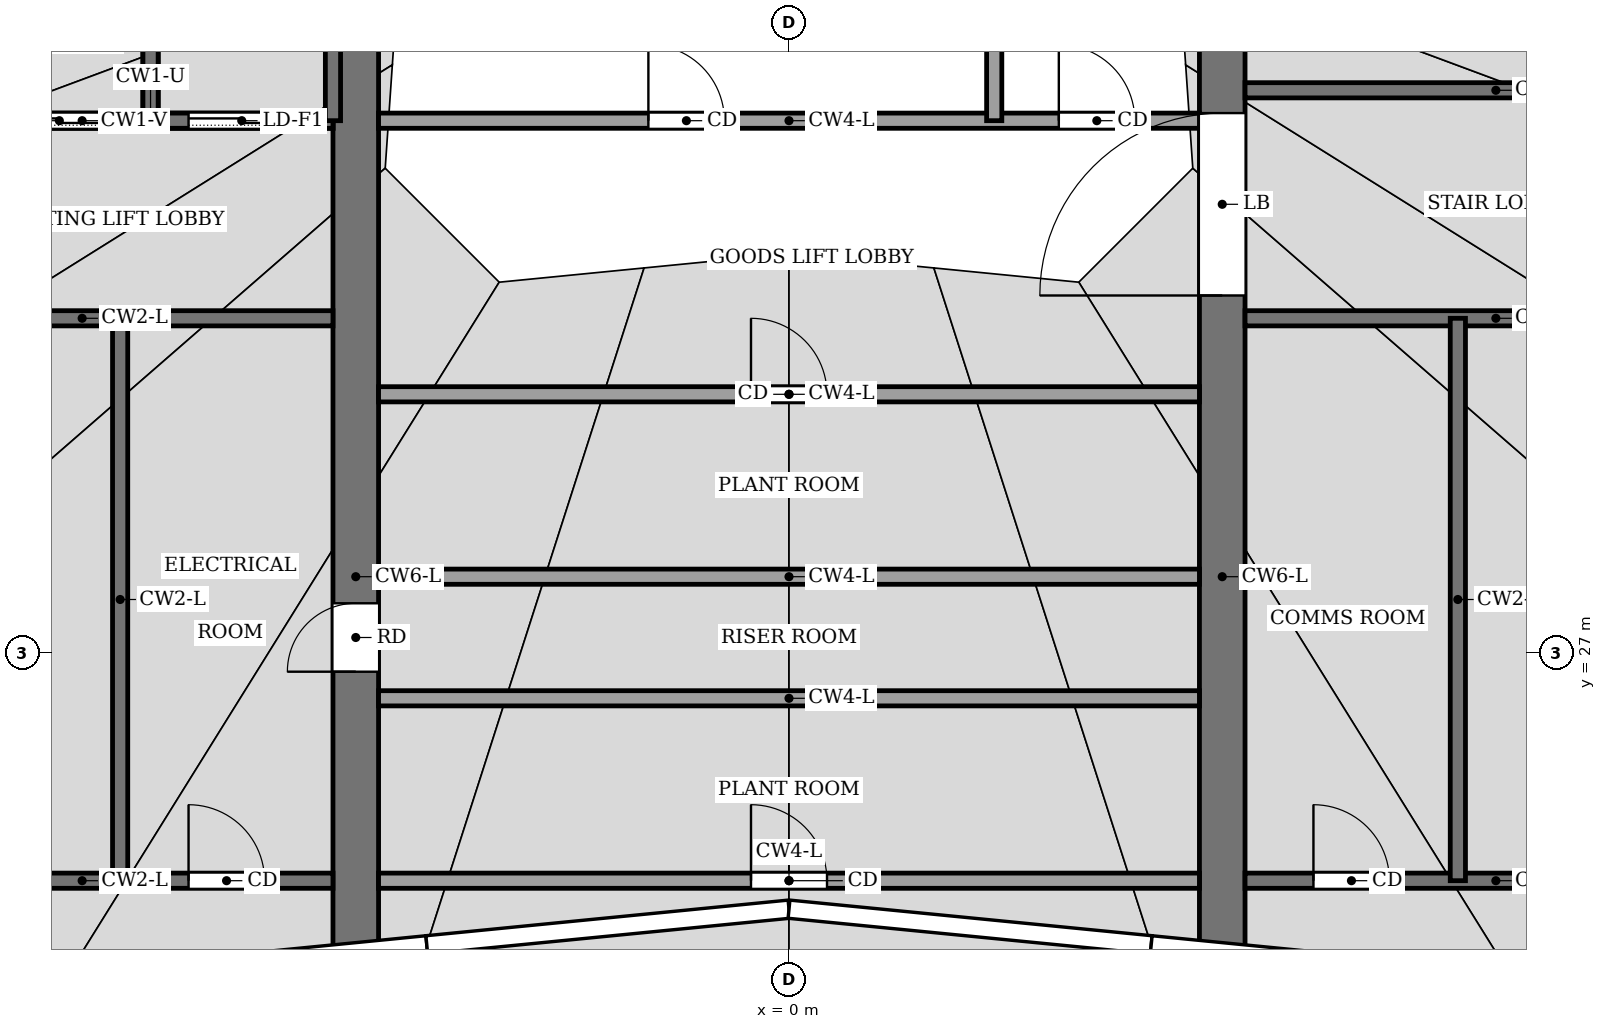
"""IFC4 building model, lengths in metres.
Left out: names, types, materials, properties, quantities, classifications, styles, units other than length and angle.
Written with IfcOpenShell. Run it as: python <this file> out.ifc"""

import sys

from ifc_helpers import new_model, si_unit, direction, frame, frame_2d, origin, place, context, subcontext, project, spatial, rectangle, extrude, element, fill, save


model = new_model("IFC4")
c1 = context("Model", 3, precision=1e-05, world=origin(), true_north=direction((0.0, 1.0)))
c2 = subcontext(c1, "Body", "Model", "MODEL_VIEW")
j1 = project(units=[si_unit("LENGTHUNIT", "METRE"), si_unit("PLANEANGLEUNIT", "RADIAN")], contexts=[c1])
p1 = place(None, origin())
s1 = spatial("IfcSite", under=j1, at=p1, CompositionType="ELEMENT")
p2 = place(p1, origin())
s2 = spatial("IfcBuilding", under=s1, at=p2, CompositionType="ELEMENT")
p3 = place(p2, frame((0.0, 0.0, 368.0)))
s3 = spatial("IfcBuildingStorey", under=s2, at=p3, CompositionType="ELEMENT", Elevation=368.0)
p4 = place(p3, frame((-5.7, 18.4, -0.15), z_axis=(0.0, 0.0, 1.0), x_axis=(0.0, 1.0, 0.0)))
e1 = element("IfcWall", 1, at=p4, inside=s3, PredefinedType="SHEAR", context=c2, shape_type="SweptSolid", body=[
    extrude(rectangle(XDim=19.2, YDim=0.6, at=frame_2d((9.6, 0.0))), origin(), (0.0, 0.0, 1.0), 3.45),
])
p5 = place(p4, frame((8.35, 0.0, 0.15)))
e2 = element("IfcOpeningElement", 2, at=p5, cuts=e1, PredefinedType="OPENING", context=c2, shape_type="SweptSolid", body=[
    extrude(rectangle(XDim=0.9, YDim=2.1, at=frame_2d((0.45, 1.05))), frame((0.0, 0.31, 0.0), z_axis=(0.0, -1.0, 0.0), x_axis=(1.0, 0.0, 0.0)), (0.0, 0.0, 1.0), 0.62),
])
p6 = place(p3, frame((5.7, 18.4, -0.15), z_axis=(0.0, 0.0, 1.0), x_axis=(0.0, 1.0, 0.0)))
e3 = element("IfcWall", 3, at=p6, inside=s3, PredefinedType="SHEAR", context=c2, shape_type="SweptSolid", body=[
    extrude(rectangle(XDim=19.2, YDim=0.6, at=frame_2d((9.6, 0.0))), origin(), (0.0, 0.0, 1.0), 3.45),
])
p7 = place(p6, frame((13.3, 0.0, 0.15)))
e4 = element("IfcOpeningElement", 4, at=p7, cuts=e3, PredefinedType="OPENING", context=c2, shape_type="SweptSolid", body=[
    extrude(rectangle(XDim=2.4, YDim=2.4, at=frame_2d((1.2, 1.2))), frame((0.0, 0.31, 0.0), z_axis=(0.0, -1.0, 0.0), x_axis=(1.0, 0.0, 0.0)), (0.0, 0.0, 1.0), 0.62),
])
p8 = place(p3, frame((-12.6, 24.0, 0.0), z_axis=(0.0, 0.0, 1.0), x_axis=(1.0, 0.0, 0.0)))
e5 = element("IfcWall", 5, at=p8, inside=s3, PredefinedType="PARTITIONING", context=c2, shape_type="SweptSolid", body=[
    extrude(rectangle(XDim=6.6, YDim=0.2, at=frame_2d((3.3, 0.0))), origin(), (0.0, 0.0, 1.0), 3.3),
])
p9 = place(p8, frame((4.7, 0.0, 0.0)))
e6 = element("IfcOpeningElement", 6, at=p9, cuts=e5, PredefinedType="OPENING", context=c2, shape_type="SweptSolid", body=[
    extrude(rectangle(XDim=1.0, YDim=2.1, at=frame_2d((0.5, 1.05))), frame((0.0, 0.11, 0.0), z_axis=(0.0, -1.0, 0.0), x_axis=(1.0, 0.0, 0.0)), (0.0, 0.0, 1.0), 0.22),
])
p10 = place(p3, frame((-5.4, 24.0, 0.0), z_axis=(0.0, 0.0, 1.0), x_axis=(1.0, 0.0, 0.0)))
e7 = element("IfcWall", 7, at=p10, inside=s3, PredefinedType="PARTITIONING", context=c2, shape_type="SweptSolid", body=[
    extrude(rectangle(XDim=10.8, YDim=0.2, at=frame_2d((5.4, 0.0))), origin(), (0.0, 0.0, 1.0), 3.3),
])
p11 = place(p10, frame((4.9, 0.0, 0.0)))
e8 = element("IfcOpeningElement", 8, at=p11, cuts=e7, PredefinedType="OPENING", context=c2, shape_type="SweptSolid", body=[
    extrude(rectangle(XDim=1.0, YDim=2.1, at=frame_2d((0.5, 1.05))), frame((0.0, 0.11, 0.0), z_axis=(0.0, -1.0, 0.0), x_axis=(1.0, 0.0, 0.0)), (0.0, 0.0, 1.0), 0.22),
])
p12 = place(p3, frame((6.0, 24.0, 0.0), z_axis=(0.0, 0.0, 1.0), x_axis=(1.0, 0.0, 0.0)))
e9 = element("IfcWall", 9, at=p12, inside=s3, PredefinedType="PARTITIONING", context=c2, shape_type="SweptSolid", body=[
    extrude(rectangle(XDim=6.6, YDim=0.2, at=frame_2d((3.3, 0.0))), origin(), (0.0, 0.0, 1.0), 3.3),
])
p13 = place(p12, frame((0.9, 0.0, 0.0)))
e10 = element("IfcOpeningElement", 10, at=p13, cuts=e9, PredefinedType="OPENING", context=c2, shape_type="SweptSolid", body=[
    extrude(rectangle(XDim=1.0, YDim=2.1, at=frame_2d((0.5, 1.05))), frame((0.0, 0.11, 0.0), z_axis=(0.0, -1.0, 0.0), x_axis=(1.0, 0.0, 0.0)), (0.0, 0.0, 1.0), 0.22),
])
p14 = place(p12, frame((4.4, 0.0, 0.0)))
e11 = element("IfcOpeningElement", 11, at=p14, cuts=e9, PredefinedType="OPENING", context=c2, shape_type="SweptSolid", body=[
    extrude(rectangle(XDim=1.2, YDim=2.2, at=frame_2d((0.6, 1.1))), frame((0.0, 0.11, 0.0), z_axis=(0.0, -1.0, 0.0), x_axis=(1.0, 0.0, 0.0)), (0.0, 0.0, 1.0), 0.22),
])
for number, where, z_axis, x_axis in (
    (12, (-5.4, 26.4, 0.0), (0.0, 0.0, 1.0), (1.0, 0.0, 0.0)),
    (13, (-5.4, 28.0, 0.0), (0.0, 0.0, 1.0), (1.0, 0.0, 0.0)),
):
    element("IfcWall", number, at=place(p3, frame(where, z_axis=z_axis, x_axis=x_axis)), inside=s3, PredefinedType="PARTITIONING", context=c2, shape_type="SweptSolid", body=[
        extrude(rectangle(XDim=10.8, YDim=0.2, at=frame_2d((5.4, 0.0))), origin(), (0.0, 0.0, 1.0), 3.3),
    ])
p15 = place(p3, frame((-5.4, 30.4, 0.0), z_axis=(0.0, 0.0, 1.0), x_axis=(1.0, 0.0, 0.0)))
e14 = element("IfcWall", 14, at=p15, inside=s3, PredefinedType="PARTITIONING", context=c2, shape_type="SweptSolid", body=[
    extrude(rectangle(XDim=10.8, YDim=0.2, at=frame_2d((5.4, 0.0))), origin(), (0.0, 0.0, 1.0), 3.3),
])
p16 = place(p15, frame((4.9, 0.0, 0.0)))
e15 = element("IfcOpeningElement", 15, at=p16, cuts=e14, PredefinedType="OPENING", context=c2, shape_type="SweptSolid", body=[
    extrude(rectangle(XDim=1.0, YDim=2.1, at=frame_2d((0.5, 1.05))), frame((0.0, 0.11, 0.0), z_axis=(0.0, -1.0, 0.0), x_axis=(1.0, 0.0, 0.0)), (0.0, 0.0, 1.0), 0.22),
])
p17 = place(p3, frame((-12.6, 31.4, 0.0), z_axis=(0.0, 0.0, 1.0), x_axis=(1.0, 0.0, 0.0)))
e16 = element("IfcWall", 16, at=p17, inside=s3, PredefinedType="PARTITIONING", context=c2, shape_type="SweptSolid", body=[
    extrude(rectangle(XDim=6.6, YDim=0.2, at=frame_2d((3.3, 0.0))), origin(), (0.0, 0.0, 1.0), 3.3),
])
p18 = place(p17, frame((1.0, 0.0, 0.0)))
e17 = element("IfcOpeningElement", 17, at=p18, cuts=e16, PredefinedType="OPENING", context=c2, shape_type="SweptSolid", body=[
    extrude(rectangle(XDim=1.2, YDim=2.2, at=frame_2d((0.6, 1.1))), frame((0.0, 0.11, 0.0), z_axis=(0.0, -1.0, 0.0), x_axis=(1.0, 0.0, 0.0)), (0.0, 0.0, 1.0), 0.22),
])
p19 = place(p3, frame((6.0, 31.4, 0.0), z_axis=(0.0, 0.0, 1.0), x_axis=(1.0, 0.0, 0.0)))
e18 = element("IfcWall", 18, at=p19, inside=s3, PredefinedType="PARTITIONING", context=c2, shape_type="SweptSolid", body=[
    extrude(rectangle(XDim=6.6, YDim=0.2, at=frame_2d((3.3, 0.0))), origin(), (0.0, 0.0, 1.0), 3.3),
])
p20 = place(p3, frame((-12.6, 34.0, 0.0), z_axis=(0.0, 0.0, 1.0), x_axis=(1.0, 0.0, 0.0)))
e19 = element("IfcWall", 19, at=p20, inside=s3, PredefinedType="PARTITIONING", context=c2, shape_type="SweptSolid", body=[
    extrude(rectangle(XDim=6.6, YDim=0.2, at=frame_2d((3.3, 0.0))), origin(), (0.0, 0.0, 1.0), 3.3),
])
p21 = place(p20, frame((4.7, 0.0, 0.0)))
e20 = element("IfcOpeningElement", 20, at=p21, cuts=e19, PredefinedType="OPENING", context=c2, shape_type="SweptSolid", body=[
    extrude(rectangle(XDim=1.4, YDim=2.2, at=frame_2d((0.7, 1.1))), frame((0.0, 0.11, 0.0), z_axis=(0.0, -1.0, 0.0), x_axis=(1.0, 0.0, 0.0)), (0.0, 0.0, 1.0), 0.22),
])
p22 = place(p20, frame((2.3, 0.0, 0.0)))
e21 = element("IfcOpeningElement", 21, at=p22, cuts=e19, PredefinedType="OPENING", context=c2, shape_type="SweptSolid", body=[
    extrude(rectangle(XDim=1.4, YDim=2.2, at=frame_2d((0.7, 1.1))), frame((0.0, 0.11, 0.0), z_axis=(0.0, -1.0, 0.0), x_axis=(1.0, 0.0, 0.0)), (0.0, 0.0, 1.0), 0.22),
])
p23 = place(p20, frame((0.45, 0.0, 0.0)))
e22 = element("IfcOpeningElement", 22, at=p23, cuts=e19, PredefinedType="OPENING", context=c2, shape_type="SweptSolid", body=[
    extrude(rectangle(XDim=0.9, YDim=2.1, at=frame_2d((0.45, 1.05))), frame((0.0, 0.11, 0.0), z_axis=(0.0, -1.0, 0.0), x_axis=(1.0, 0.0, 0.0)), (0.0, 0.0, 1.0), 0.22),
])
p24 = place(p3, frame((-5.4, 34.0, 0.0), z_axis=(0.0, 0.0, 1.0), x_axis=(1.0, 0.0, 0.0)))
e23 = element("IfcWall", 23, at=p24, inside=s3, PredefinedType="PARTITIONING", context=c2, shape_type="SweptSolid", body=[
    extrude(rectangle(XDim=10.8, YDim=0.2, at=frame_2d((5.4, 0.0))), origin(), (0.0, 0.0, 1.0), 3.3),
])
p25 = place(p24, frame((3.55, 0.0, 0.0)))
e24 = element("IfcOpeningElement", 24, at=p25, cuts=e23, PredefinedType="OPENING", context=c2, shape_type="SweptSolid", body=[
    extrude(rectangle(XDim=1.0, YDim=2.1, at=frame_2d((0.5, 1.05))), frame((0.0, 0.11, 0.0), z_axis=(0.0, -1.0, 0.0), x_axis=(1.0, 0.0, 0.0)), (0.0, 0.0, 1.0), 0.22),
])
p26 = place(p24, frame((8.95, 0.0, 0.0)))
e25 = element("IfcOpeningElement", 25, at=p26, cuts=e23, PredefinedType="OPENING", context=c2, shape_type="SweptSolid", body=[
    extrude(rectangle(XDim=1.0, YDim=2.1, at=frame_2d((0.5, 1.05))), frame((0.0, 0.11, 0.0), z_axis=(0.0, -1.0, 0.0), x_axis=(1.0, 0.0, 0.0)), (0.0, 0.0, 1.0), 0.22),
])
p27 = place(p3, frame((6.0, 34.4, 0.0), z_axis=(0.0, 0.0, 1.0), x_axis=(1.0, 0.0, 0.0)))
e26 = element("IfcWall", 26, at=p27, inside=s3, PredefinedType="PARTITIONING", context=c2, shape_type="SweptSolid", body=[
    extrude(rectangle(XDim=6.6, YDim=0.2, at=frame_2d((3.3, 0.0))), origin(), (0.0, 0.0, 1.0), 3.3),
])
p28 = place(p27, frame((4.8, 0.0, 0.0)))
e27 = element("IfcOpeningElement", 27, at=p28, cuts=e26, PredefinedType="OPENING", context=c2, shape_type="SweptSolid", body=[
    extrude(rectangle(XDim=1.2, YDim=2.2, at=frame_2d((0.6, 1.1))), frame((0.0, 0.11, 0.0), z_axis=(0.0, -1.0, 0.0), x_axis=(1.0, 0.0, 0.0)), (0.0, 0.0, 1.0), 0.22),
])
p29 = place(p3, frame((-8.8, 24.0, 0.0), z_axis=(0.0, 0.0, 1.0), x_axis=(0.0, 1.0, 0.0)))
e28 = element("IfcWall", 28, at=p29, inside=s3, PredefinedType="PARTITIONING", context=c2, shape_type="SweptSolid", body=[
    extrude(rectangle(XDim=7.4, YDim=0.2, at=frame_2d((3.7, 0.0))), origin(), (0.0, 0.0, 1.0), 3.3),
])
for number, where, z_axis, x_axis in (
    (29, (-8.4, 34.0, 0.0), (0.0, 0.0, 1.0), (0.0, 1.0, 0.0)),
    (30, (2.7, 34.0, 0.0), (0.0, 0.0, 1.0), (0.0, 1.0, 0.0)),
):
    element("IfcWall", number, at=place(p3, frame(where, z_axis=z_axis, x_axis=x_axis)), inside=s3, PredefinedType="PARTITIONING", context=c2, shape_type="SweptSolid", body=[
        extrude(rectangle(XDim=3.6, YDim=0.2, at=frame_2d((1.8, 0.0))), origin(), (0.0, 0.0, 1.0), 3.3),
    ])
p30 = place(p3, frame((8.8, 24.0, 0.0), z_axis=(0.0, 0.0, 1.0), x_axis=(0.0, 1.0, 0.0)))
e31 = element("IfcWall", 31, at=p30, inside=s3, PredefinedType="PARTITIONING", context=c2, shape_type="SweptSolid", body=[
    extrude(rectangle(XDim=7.4, YDim=0.2, at=frame_2d((3.7, 0.0))), origin(), (0.0, 0.0, 1.0), 3.3),
])
p31 = place(p3, frame((-10.8, 34.0, 3.5), z_axis=(0.0, 0.0, 1.0), x_axis=(1.0, 0.0, 0.0)))
e32 = element("IfcWall", 32, at=p31, inside=s3, PredefinedType="PARTITIONING", context=c2, shape_type="SweptSolid", body=[
    extrude(rectangle(XDim=4.8, YDim=0.2, at=frame_2d((2.4, 0.0))), origin(), (0.0, 0.0, 1.0), 5.0),
])
for number, where, z_axis, x_axis in (
    (33, (-6.0, 34.0, 3.5), (0.0, 0.0, 1.0), (0.0, 1.0, 0.0)),
    (34, (-8.4, 34.0, 3.5), (0.0, 0.0, 1.0), (0.0, 1.0, 0.0)),
):
    element("IfcWall", number, at=place(p3, frame(where, z_axis=z_axis, x_axis=x_axis)), inside=s3, PredefinedType="PARTITIONING", context=c2, shape_type="SweptSolid", body=[
        extrude(rectangle(XDim=3.6, YDim=0.2, at=frame_2d((1.8, 0.0))), origin(), (0.0, 0.0, 1.0), 5.0),
    ])
p32 = place(p21, origin())
e35 = element("IfcDoor", 35, at=p32, inside=s3, OperationType="SLIDING_TO_LEFT", PredefinedType="DOOR", context=c2, shape_type="SweptSolid", body=[
    extrude(rectangle(XDim=1.4, YDim=2.2, at=frame_2d((0.7, 1.1))), frame((0.0, 0.025, 0.0), z_axis=(0.0, -1.0, 0.0), x_axis=(1.0, 0.0, 0.0)), (0.0, 0.0, 1.0), 0.05),
])
fill(e20, e35)
p33 = place(p22, origin())
e36 = element("IfcDoor", 36, at=p33, inside=s3, OperationType="SLIDING_TO_LEFT", PredefinedType="DOOR", context=c2, shape_type="SweptSolid", body=[
    extrude(rectangle(XDim=1.4, YDim=2.2, at=frame_2d((0.7, 1.1))), frame((0.0, 0.025, 0.0), z_axis=(0.0, -1.0, 0.0), x_axis=(1.0, 0.0, 0.0)), (0.0, 0.0, 1.0), 0.05),
])
fill(e21, e36)
p34 = place(p11, origin())
e37 = element("IfcDoor", 37, at=p34, inside=s3, OperationType="SINGLE_SWING_RIGHT", PredefinedType="DOOR", context=c2, shape_type="SweptSolid", body=[
    extrude(rectangle(XDim=1.0, YDim=2.1, at=frame_2d((0.5, 1.05))), frame((0.0, 0.025, 0.0), z_axis=(0.0, -1.0, 0.0), x_axis=(1.0, 0.0, 0.0)), (0.0, 0.0, 1.0), 0.05),
])
fill(e8, e37)
p35 = place(p16, origin())
e38 = element("IfcDoor", 38, at=p35, inside=s3, OperationType="SINGLE_SWING_LEFT", PredefinedType="DOOR", context=c2, shape_type="SweptSolid", body=[
    extrude(rectangle(XDim=1.0, YDim=2.1, at=frame_2d((0.5, 1.05))), frame((0.0, 0.025, 0.0), z_axis=(0.0, -1.0, 0.0), x_axis=(1.0, 0.0, 0.0)), (0.0, 0.0, 1.0), 0.05),
])
fill(e15, e38)
p36 = place(p25, origin())
e39 = element("IfcDoor", 39, at=p36, inside=s3, OperationType="SINGLE_SWING_LEFT", PredefinedType="DOOR", context=c2, shape_type="SweptSolid", body=[
    extrude(rectangle(XDim=1.0, YDim=2.1, at=frame_2d((0.5, 1.05))), frame((0.0, 0.025, 0.0), z_axis=(0.0, -1.0, 0.0), x_axis=(1.0, 0.0, 0.0)), (0.0, 0.0, 1.0), 0.05),
])
fill(e24, e39)
p37 = place(p9, origin())
e40 = element("IfcDoor", 40, at=p37, inside=s3, OperationType="SINGLE_SWING_LEFT", PredefinedType="DOOR", context=c2, shape_type="SweptSolid", body=[
    extrude(rectangle(XDim=1.0, YDim=2.1, at=frame_2d((0.5, 1.05))), frame((0.0, 0.025, 0.0), z_axis=(0.0, -1.0, 0.0), x_axis=(1.0, 0.0, 0.0)), (0.0, 0.0, 1.0), 0.05),
])
fill(e6, e40)
p38 = place(p13, origin())
e41 = element("IfcDoor", 41, at=p38, inside=s3, OperationType="SINGLE_SWING_RIGHT", PredefinedType="DOOR", context=c2, shape_type="SweptSolid", body=[
    extrude(rectangle(XDim=1.0, YDim=2.1, at=frame_2d((0.5, 1.05))), frame((0.0, 0.025, 0.0), z_axis=(0.0, -1.0, 0.0), x_axis=(1.0, 0.0, 0.0)), (0.0, 0.0, 1.0), 0.05),
])
fill(e10, e41)
p39 = place(p26, origin())
e42 = element("IfcDoor", 42, at=p39, inside=s3, OperationType="SINGLE_SWING_LEFT", PredefinedType="DOOR", context=c2, shape_type="SweptSolid", body=[
    extrude(rectangle(XDim=1.0, YDim=2.1, at=frame_2d((0.5, 1.05))), frame((0.0, 0.025, 0.0), z_axis=(0.0, -1.0, 0.0), x_axis=(1.0, 0.0, 0.0)), (0.0, 0.0, 1.0), 0.05),
])
fill(e25, e42)
p40 = place(p5, origin())
e43 = element("IfcDoor", 43, at=p40, inside=s3, OperationType="SINGLE_SWING_LEFT", PredefinedType="DOOR", context=c2, shape_type="SweptSolid", body=[
    extrude(rectangle(XDim=0.9, YDim=2.1, at=frame_2d((0.45, 1.05))), frame((0.0, 0.025, 0.0), z_axis=(0.0, -1.0, 0.0), x_axis=(1.0, 0.0, 0.0)), (0.0, 0.0, 1.0), 0.05),
])
fill(e2, e43)
p41 = place(p7, origin())
e44 = element("IfcDoor", 44, at=p41, inside=s3, OperationType="DOUBLE_DOOR_SINGLE_SWING", PredefinedType="DOOR", context=c2, shape_type="SweptSolid", body=[
    extrude(rectangle(XDim=2.4, YDim=2.4, at=frame_2d((1.2, 1.2))), frame((0.0, 0.025, 0.0), z_axis=(0.0, -1.0, 0.0), x_axis=(1.0, 0.0, 0.0)), (0.0, 0.0, 1.0), 0.05),
])
fill(e4, e44)
save(model, sys.argv[1])
